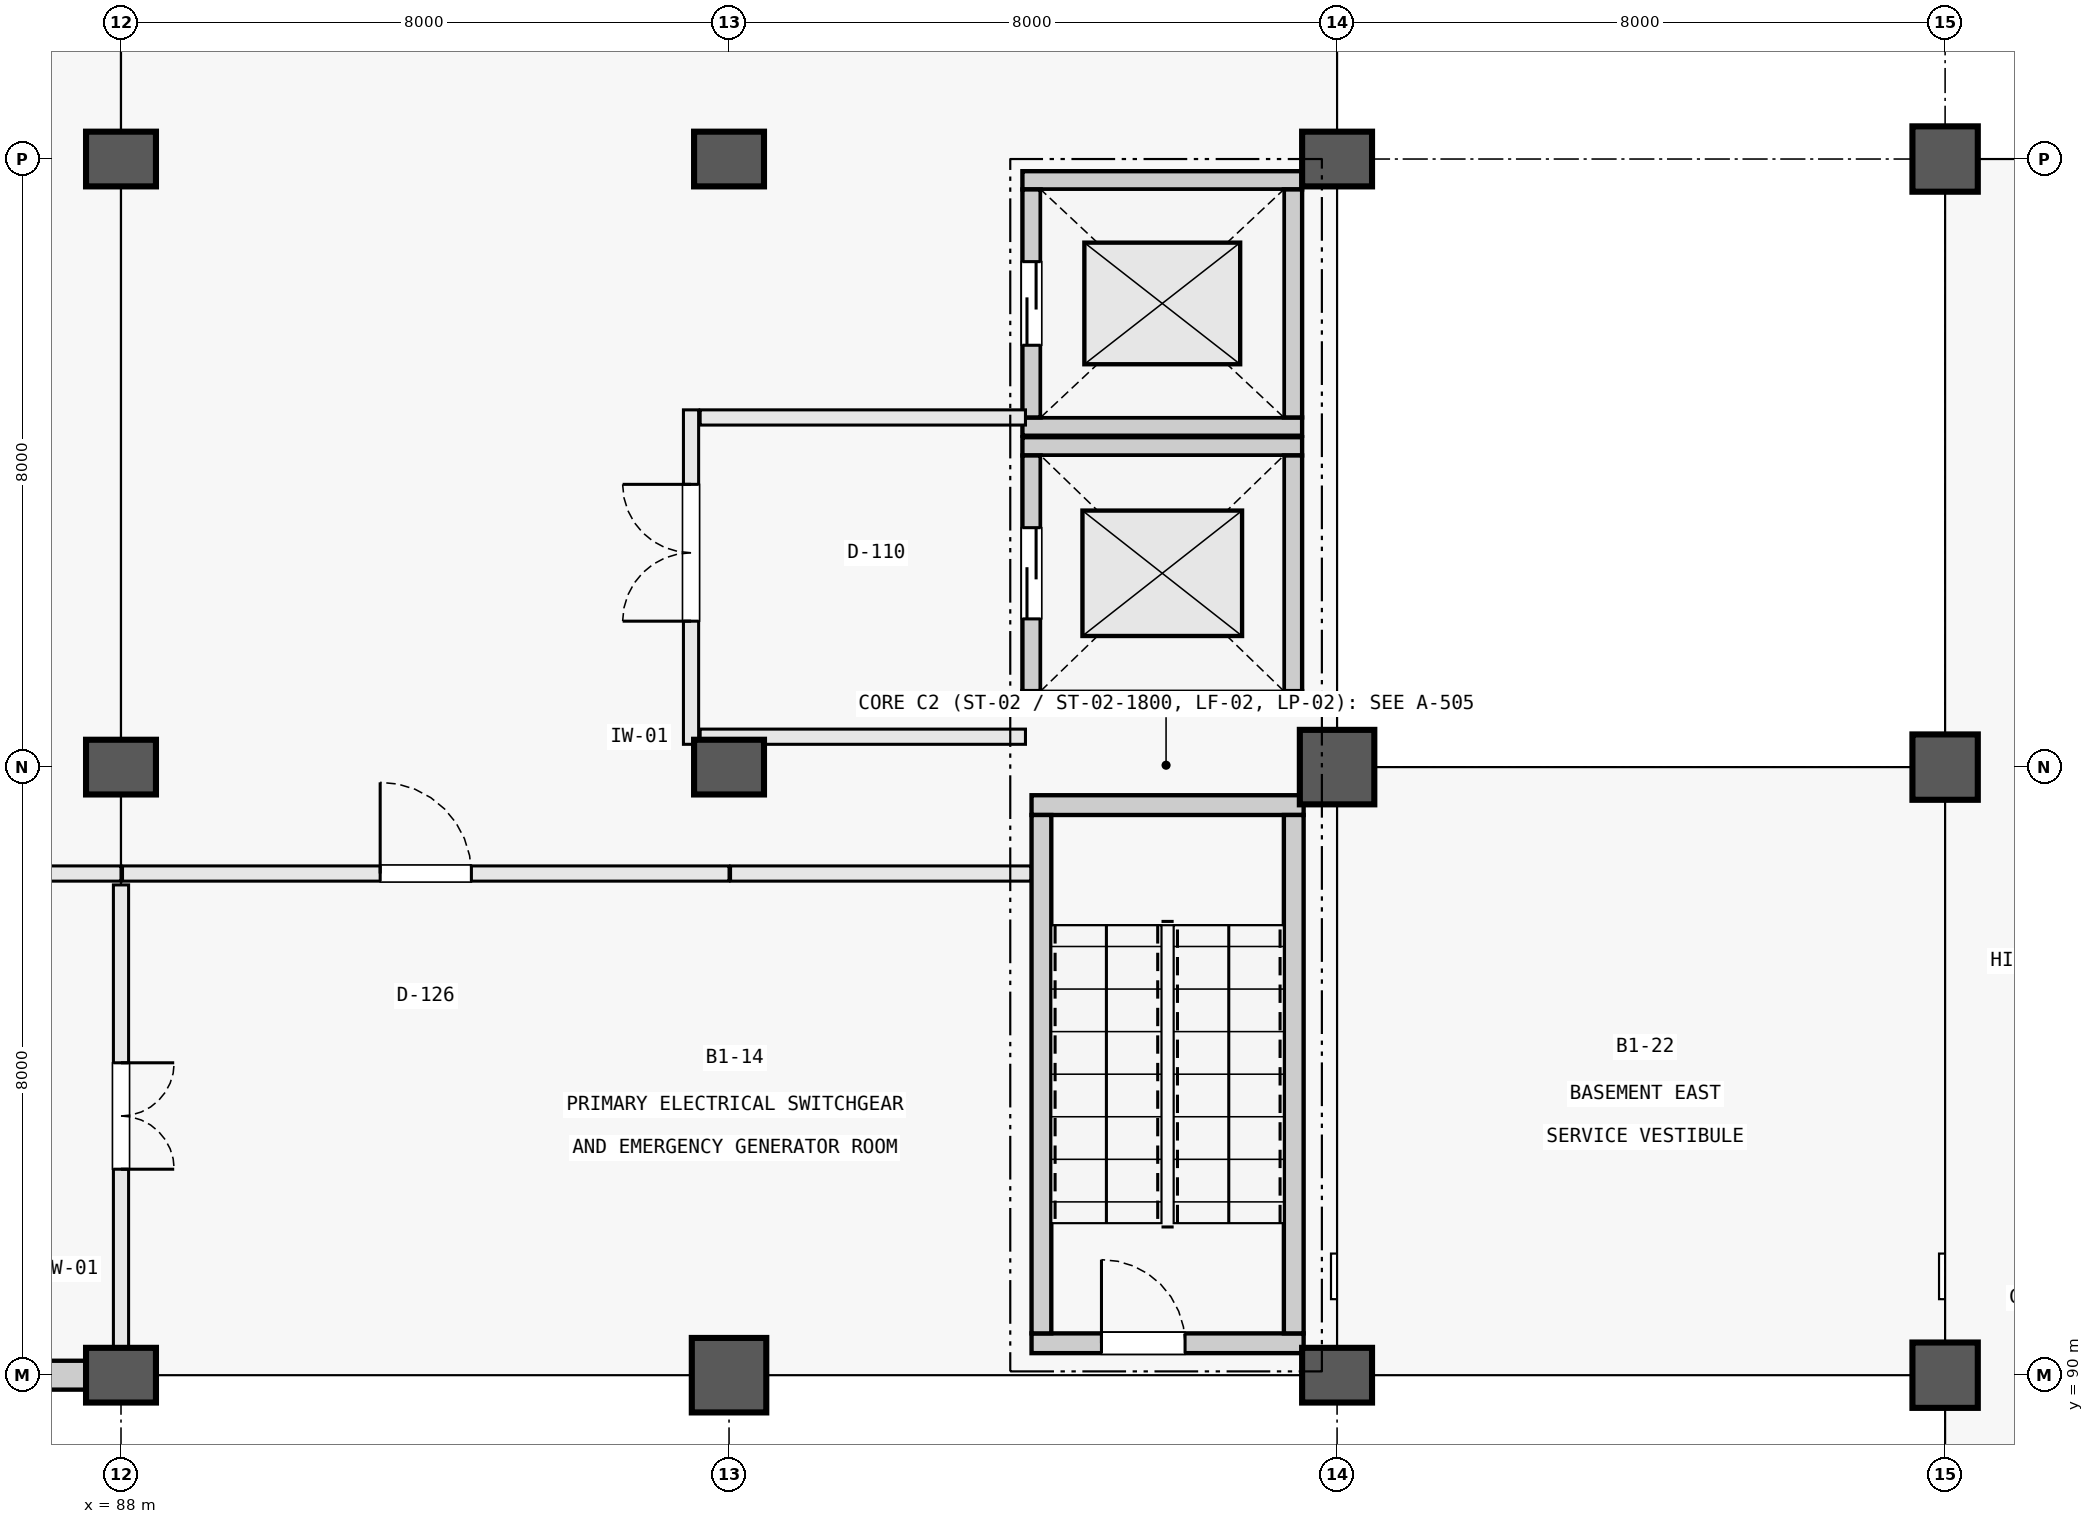
"""IFC4 building model, lengths in metres.
Left out: names, types, materials, properties, quantities, classifications, styles, units other than length and angle.
Written with IfcOpenShell. Run it as: python <this file> out.ifc"""

import sys

from ifc_helpers import new_model, si_unit, direction, frame, frame_2d, origin, origin_2d, place, context, subcontext, project, spatial, rectangle, extrude, element, fill, save


model = new_model("IFC4")
c1 = context("Model", 3, precision=1e-05, world=origin(), true_north=direction((0.0, 1.0)))
c2 = subcontext(c1, "Body", "Model", "MODEL_VIEW")
j1 = project(units=[si_unit("LENGTHUNIT", "METRE"), si_unit("PLANEANGLEUNIT", "RADIAN")], contexts=[c1])
p1 = place(None, origin())
s1 = spatial("IfcSite", under=j1, at=p1, CompositionType="ELEMENT")
p2 = place(p1, origin())
s2 = spatial("IfcBuilding", under=s1, at=p2, CompositionType="ELEMENT")
p3 = place(p2, frame((0.0, 0.0, -5.4)))
s3 = spatial("IfcBuildingStorey", under=s2, at=p3, CompositionType="ELEMENT", Elevation=-5.4)
for number, where, z_axis, x_axis in (
    (1, (88.0, 90.0, 0.0), (0.0, 0.0, 1.0), (1.0, 0.0, 0.0)),
    (2, (88.0, 98.0, 0.0), (0.0, 0.0, 1.0), (1.0, 0.0, 0.0)),
    (3, (88.0, 106.0, 0.0), (0.0, 0.0, 1.0), (1.0, 0.0, 0.0)),
):
    element("IfcColumn", number, at=place(p3, frame(where, z_axis=z_axis, x_axis=x_axis)), inside=s3, PredefinedType="COLUMN", context=c2, shape_type="SweptSolid", body=[
        extrude(rectangle(XDim=0.92, YDim=0.72, at=origin_2d()), origin(), (0.0, 0.0, 1.0), 5.4),
    ])
p4 = place(p3, frame((96.0, 90.0, 0.0), z_axis=(0.0, 0.0, 1.0), x_axis=(1.0, 0.0, 0.0)))
e4 = element("IfcColumn", 4, at=p4, inside=s3, PredefinedType="COLUMN", context=c2, shape_type="SweptSolid", body=[
    extrude(rectangle(XDim=0.98, YDim=0.98, at=origin_2d()), origin(), (0.0, 0.0, 1.0), 5.4),
])
for number, where, z_axis, x_axis in (
    (5, (96.0, 98.0, 0.0), (0.0, 0.0, 1.0), (1.0, 0.0, 0.0)),
    (6, (96.0, 106.0, 0.0), (0.0, 0.0, 1.0), (1.0, 0.0, 0.0)),
    (7, (104.0, 90.0, 0.0), (0.0, 0.0, 1.0), (1.0, 0.0, 0.0)),
):
    element("IfcColumn", number, at=place(p3, frame(where, z_axis=z_axis, x_axis=x_axis)), inside=s3, PredefinedType="COLUMN", context=c2, shape_type="SweptSolid", body=[
        extrude(rectangle(XDim=0.92, YDim=0.72, at=origin_2d()), origin(), (0.0, 0.0, 1.0), 5.4),
    ])
p5 = place(p3, frame((104.0, 98.0, 0.0), z_axis=(0.0, 0.0, 1.0), x_axis=(1.0, 0.0, 0.0)))
e8 = element("IfcColumn", 8, at=p5, inside=s3, PredefinedType="COLUMN", context=c2, shape_type="SweptSolid", body=[
    extrude(rectangle(XDim=0.98, YDim=0.98, at=origin_2d()), origin(), (0.0, 0.0, 1.0), 5.4),
])
p6 = place(p3, frame((104.0, 106.0, 0.0), z_axis=(0.0, 0.0, 1.0), x_axis=(1.0, 0.0, 0.0)))
e9 = element("IfcColumn", 9, at=p6, inside=s3, PredefinedType="COLUMN", context=c2, shape_type="SweptSolid", body=[
    extrude(rectangle(XDim=0.92, YDim=0.72, at=origin_2d()), origin(), (0.0, 0.0, 1.0), 5.4),
])
for number, where, z_axis, x_axis in (
    (10, (112.0, 90.0, 0.0), (0.0, 0.0, 1.0), (1.0, 0.0, 0.0)),
    (11, (112.0, 98.0, 0.0), (0.0, 0.0, 1.0), (1.0, 0.0, 0.0)),
    (12, (112.0, 106.0, 0.0), (0.0, 0.0, 1.0), (1.0, 0.0, 0.0)),
):
    element("IfcColumn", number, at=place(p3, frame(where, z_axis=z_axis, x_axis=x_axis)), inside=s3, PredefinedType="COLUMN", context=c2, shape_type="SweptSolid", body=[
        extrude(rectangle(XDim=0.86, YDim=0.86, at=origin_2d()), origin(), (0.0, 0.0, 1.0), 5.4),
    ])
p7 = place(p3, frame((80.49, 90.0, 0.0), z_axis=(0.0, 0.0, 1.0), x_axis=(1.0, 0.0, 0.0)))
e13 = element("IfcWall", 13, at=p7, inside=s3, PredefinedType="SHEAR", context=c2, shape_type="SweptSolid", body=[
    extrude(rectangle(XDim=7.05, YDim=0.38, at=frame_2d((3.525, 0.0))), origin(), (0.0, 0.0, 1.0), 4.98),
])
p8 = place(p3, frame((99.98, 90.42, 0.0), z_axis=(0.0, 0.0, 1.0), x_axis=(1.0, 0.0, 0.0)))
e14 = element("IfcWall", 14, at=p8, inside=s3, PredefinedType="SOLIDWALL", context=c2, shape_type="SweptSolid", body=[
    extrude(rectangle(XDim=3.58, YDim=0.26, at=frame_2d((1.79, 0.0))), origin(), (0.0, 0.0, 1.0), 5.4),
])
p9 = place(p8, frame((0.92, 0.0, 0.0)))
e15 = element("IfcOpeningElement", 15, at=p9, cuts=e14, PredefinedType="OPENING", context=c2, shape_type="SweptSolid", body=[
    extrude(rectangle(XDim=1.1, YDim=2.2, at=frame_2d((0.55, 1.1))), frame((0.0, 0.142, 0.0), z_axis=(0.0, -1.0, 0.0), x_axis=(1.0, 0.0, 0.0)), (0.0, 0.0, 1.0), 0.284),
])
p10 = place(p3, frame((99.98, 97.5, 0.0), z_axis=(0.0, 0.0, 1.0), x_axis=(1.0, 0.0, 0.0)))
e16 = element("IfcWall", 16, at=p10, inside=s3, PredefinedType="SOLIDWALL", context=c2, shape_type="SweptSolid", body=[
    extrude(rectangle(XDim=3.58, YDim=0.26, at=frame_2d((1.79, 0.0))), origin(), (0.0, 0.0, 1.0), 5.4),
])
for number, where, z_axis, x_axis in (
    (17, (100.11, 90.55, 0.0), (0.0, 0.0, 1.0), (0.0, 1.0, 0.0)),
    (18, (103.43, 90.55, 0.0), (0.0, 0.0, 1.0), (0.0, 1.0, 0.0)),
):
    element("IfcWall", number, at=place(p3, frame(where, z_axis=z_axis, x_axis=x_axis)), inside=s3, PredefinedType="SOLIDWALL", context=c2, shape_type="SweptSolid", body=[
        extrude(rectangle(XDim=6.82, YDim=0.26, at=frame_2d((3.41, 0.0))), origin(), (0.0, 0.0, 1.0), 5.4),
    ])
for number, where, z_axis, x_axis in (
    (19, (99.86, 98.88, 0.0), (0.0, 0.0, 1.0), (1.0, 0.0, 0.0)),
    (20, (99.86, 102.22, 0.0), (0.0, 0.0, 1.0), (1.0, 0.0, 0.0)),
):
    element("IfcWall", number, at=place(p3, frame(where, z_axis=z_axis, x_axis=x_axis)), inside=s3, PredefinedType="SOLIDWALL", context=c2, shape_type="SweptSolid", body=[
        extrude(rectangle(XDim=3.68, YDim=0.24, at=frame_2d((1.84, 0.0))), origin(), (0.0, 0.0, 1.0), 5.4),
    ])
p11 = place(p3, frame((99.98, 99.0, 0.0), z_axis=(0.0, 0.0, 1.0), x_axis=(0.0, 1.0, 0.0)))
e21 = element("IfcWall", 21, at=p11, inside=s3, PredefinedType="SOLIDWALL", context=c2, shape_type="SweptSolid", body=[
    extrude(rectangle(XDim=3.1, YDim=0.24, at=frame_2d((1.55, 0.0))), origin(), (0.0, 0.0, 1.0), 5.4),
])
p12 = place(p11, frame((0.95, 0.0, 0.0)))
e22 = element("IfcOpeningElement", 22, at=p12, cuts=e21, PredefinedType="OPENING", context=c2, shape_type="SweptSolid", body=[
    extrude(rectangle(XDim=1.2, YDim=2.2, at=frame_2d((0.6, 1.1))), frame((0.0, 0.132, 0.0), z_axis=(0.0, -1.0, 0.0), x_axis=(1.0, 0.0, 0.0)), (0.0, 0.0, 1.0), 0.264),
])
p13 = place(p3, frame((103.42, 99.0, 0.0), z_axis=(0.0, 0.0, 1.0), x_axis=(0.0, 1.0, 0.0)))
e23 = element("IfcWall", 23, at=p13, inside=s3, PredefinedType="SOLIDWALL", context=c2, shape_type="SweptSolid", body=[
    extrude(rectangle(XDim=3.1, YDim=0.24, at=frame_2d((1.55, 0.0))), origin(), (0.0, 0.0, 1.0), 5.4),
])
for number, where, z_axis, x_axis in (
    (24, (99.86, 102.48, 0.0), (0.0, 0.0, 1.0), (1.0, 0.0, 0.0)),
    (25, (99.86, 105.72, 0.0), (0.0, 0.0, 1.0), (1.0, 0.0, 0.0)),
):
    element("IfcWall", number, at=place(p3, frame(where, z_axis=z_axis, x_axis=x_axis)), inside=s3, PredefinedType="SOLIDWALL", context=c2, shape_type="SweptSolid", body=[
        extrude(rectangle(XDim=3.68, YDim=0.24, at=frame_2d((1.84, 0.0))), origin(), (0.0, 0.0, 1.0), 5.4),
    ])
p14 = place(p3, frame((99.98, 102.6, 0.0), z_axis=(0.0, 0.0, 1.0), x_axis=(0.0, 1.0, 0.0)))
e26 = element("IfcWall", 26, at=p14, inside=s3, PredefinedType="SOLIDWALL", context=c2, shape_type="SweptSolid", body=[
    extrude(rectangle(XDim=3.0, YDim=0.24, at=frame_2d((1.5, 0.0))), origin(), (0.0, 0.0, 1.0), 5.4),
])
p15 = place(p14, frame((0.95, 0.0, 0.0)))
e27 = element("IfcOpeningElement", 27, at=p15, cuts=e26, PredefinedType="OPENING", context=c2, shape_type="SweptSolid", body=[
    extrude(rectangle(XDim=1.1, YDim=2.2, at=frame_2d((0.55, 1.1))), frame((0.0, 0.132, 0.0), z_axis=(0.0, -1.0, 0.0), x_axis=(1.0, 0.0, 0.0)), (0.0, 0.0, 1.0), 0.264),
])
p16 = place(p3, frame((103.42, 102.6, 0.0), z_axis=(0.0, 0.0, 1.0), x_axis=(0.0, 1.0, 0.0)))
e28 = element("IfcWall", 28, at=p16, inside=s3, PredefinedType="SOLIDWALL", context=c2, shape_type="SweptSolid", body=[
    extrude(rectangle(XDim=3.0, YDim=0.24, at=frame_2d((1.5, 0.0))), origin(), (0.0, 0.0, 1.0), 5.4),
])
for number, where, z_axis, x_axis in (
    (29, (95.62, 98.4, 0.0), (0.0, 0.0, 1.0), (1.0, 0.0, 0.0)),
    (30, (95.62, 102.6, 0.0), (0.0, 0.0, 1.0), (1.0, 0.0, 0.0)),
):
    element("IfcWall", number, at=place(p3, frame(where, z_axis=z_axis, x_axis=x_axis)), inside=s3, PredefinedType="PARTITIONING", context=c2, shape_type="SweptSolid", body=[
        extrude(rectangle(XDim=4.28, YDim=0.2, at=frame_2d((2.14, 0.0))), origin(), (0.0, 0.0, 1.0), 4.0),
    ])
p17 = place(p3, frame((95.5, 98.3, 0.0), z_axis=(0.0, 0.0, 1.0), x_axis=(0.0, 1.0, 0.0)))
e31 = element("IfcWall", 31, at=p17, inside=s3, PredefinedType="PARTITIONING", context=c2, shape_type="SweptSolid", body=[
    extrude(rectangle(XDim=4.4, YDim=0.2, at=frame_2d((2.2, 0.0))), origin(), (0.0, 0.0, 1.0), 4.0),
])
p18 = place(p17, frame((1.62, 0.0, 0.0)))
e32 = element("IfcOpeningElement", 32, at=p18, cuts=e31, PredefinedType="OPENING", context=c2, shape_type="SweptSolid", body=[
    extrude(rectangle(XDim=1.8, YDim=2.25, at=frame_2d((0.9, 1.125))), frame((0.0, 0.112, 0.0), z_axis=(0.0, -1.0, 0.0), x_axis=(1.0, 0.0, 0.0)), (0.0, 0.0, 1.0), 0.224),
])
p19 = place(p3, frame((80.02, 96.6, 0.0), z_axis=(0.0, 0.0, 1.0), x_axis=(1.0, 0.0, 0.0)))
e33 = element("IfcWall", 33, at=p19, inside=s3, PredefinedType="PARTITIONING", context=c2, shape_type="SweptSolid", body=[
    extrude(rectangle(XDim=7.98, YDim=0.2, at=frame_2d((3.99, 0.0))), origin(), (0.0, 0.0, 1.0), 3.83),
])
p20 = place(p19, frame((3.29, 0.0, 0.0)))
e34 = element("IfcOpeningElement", 34, at=p20, cuts=e33, PredefinedType="OPENING", context=c2, shape_type="SweptSolid", body=[
    extrude(rectangle(XDim=1.4, YDim=2.2, at=frame_2d((0.7, 1.1))), frame((0.0, 0.112, 0.0), z_axis=(0.0, -1.0, 0.0), x_axis=(1.0, 0.0, 0.0)), (0.0, 0.0, 1.0), 0.224),
])
p21 = place(p3, frame((88.02, 96.6, 0.0), z_axis=(0.0, 0.0, 1.0), x_axis=(1.0, 0.0, 0.0)))
e35 = element("IfcWall", 35, at=p21, inside=s3, PredefinedType="PARTITIONING", context=c2, shape_type="SweptSolid", body=[
    extrude(rectangle(XDim=7.98, YDim=0.2, at=frame_2d((3.99, 0.0))), origin(), (0.0, 0.0, 1.0), 3.83),
])
p22 = place(p21, frame((3.39, 0.0, 0.0)))
e36 = element("IfcOpeningElement", 36, at=p22, cuts=e35, PredefinedType="OPENING", context=c2, shape_type="SweptSolid", body=[
    extrude(rectangle(XDim=1.2, YDim=2.25, at=frame_2d((0.6, 1.125))), frame((0.0, 0.112, 0.0), z_axis=(0.0, -1.0, 0.0), x_axis=(1.0, 0.0, 0.0)), (0.0, 0.0, 1.0), 0.224),
])
p23 = place(p3, frame((96.02, 96.6, 0.0), z_axis=(0.0, 0.0, 1.0), x_axis=(1.0, 0.0, 0.0)))
e37 = element("IfcWall", 37, at=p23, inside=s3, PredefinedType="PARTITIONING", context=c2, shape_type="SweptSolid", body=[
    extrude(rectangle(XDim=3.95, YDim=0.2, at=frame_2d((1.975, 0.0))), origin(), (0.0, 0.0, 1.0), 3.83),
])
p24 = place(p3, frame((88.0, 90.37, 0.0), z_axis=(0.0, 0.0, 1.0), x_axis=(0.0, 1.0, 0.0)))
e38 = element("IfcWall", 38, at=p24, inside=s3, PredefinedType="PARTITIONING", context=c2, shape_type="SweptSolid", body=[
    extrude(rectangle(XDim=6.08, YDim=0.2, at=frame_2d((3.04, 0.0))), origin(), (0.0, 0.0, 1.0), 3.83),
])
p25 = place(p24, frame((2.34, 0.0, 0.0)))
e39 = element("IfcOpeningElement", 39, at=p25, cuts=e38, PredefinedType="OPENING", context=c2, shape_type="SweptSolid", body=[
    extrude(rectangle(XDim=1.4, YDim=2.2, at=frame_2d((0.7, 1.1))), frame((0.0, 0.112, 0.0), z_axis=(0.0, -1.0, 0.0), x_axis=(1.0, 0.0, 0.0)), (0.0, 0.0, 1.0), 0.224),
])
p26 = place(p9, origin())
e40 = element("IfcDoor", 40, at=p26, inside=s3, OperationType="SINGLE_SWING_LEFT", PredefinedType="DOOR", context=c2, shape_type="SweptSolid", body=[
    extrude(rectangle(XDim=1.1, YDim=2.2, at=frame_2d((0.55, 1.1))), frame((0.0, 0.025, 0.0), z_axis=(0.0, -1.0, 0.0), x_axis=(1.0, 0.0, 0.0)), (0.0, 0.0, 1.0), 0.05),
])
fill(e15, e40)
p27 = place(p12, origin())
e41 = element("IfcDoor", 41, at=p27, inside=s3, OperationType="DOUBLE_DOOR_SLIDING", PredefinedType="DOOR", context=c2, shape_type="SweptSolid", body=[
    extrude(rectangle(XDim=1.2, YDim=2.2, at=frame_2d((0.6, 1.1))), frame((0.0, 0.025, 0.0), z_axis=(0.0, -1.0, 0.0), x_axis=(1.0, 0.0, 0.0)), (0.0, 0.0, 1.0), 0.05),
])
fill(e22, e41)
p28 = place(p15, origin())
e42 = element("IfcDoor", 42, at=p28, inside=s3, OperationType="DOUBLE_DOOR_SLIDING", PredefinedType="DOOR", context=c2, shape_type="SweptSolid", body=[
    extrude(rectangle(XDim=1.1, YDim=2.2, at=frame_2d((0.55, 1.1))), frame((0.0, 0.025, 0.0), z_axis=(0.0, -1.0, 0.0), x_axis=(1.0, 0.0, 0.0)), (0.0, 0.0, 1.0), 0.05),
])
fill(e27, e42)
p29 = place(p18, origin())
e43 = element("IfcDoor", 43, at=p29, inside=s3, OperationType="DOUBLE_DOOR_SINGLE_SWING", PredefinedType="DOOR", context=c2, shape_type="SweptSolid", body=[
    extrude(rectangle(XDim=1.8, YDim=2.25, at=frame_2d((0.9, 1.125))), frame((0.0, 0.025, 0.0), z_axis=(0.0, -1.0, 0.0), x_axis=(1.0, 0.0, 0.0)), (0.0, 0.0, 1.0), 0.05),
])
fill(e32, e43)
p30 = place(p22, origin())
e44 = element("IfcDoor", 44, at=p30, inside=s3, OperationType="SINGLE_SWING_LEFT", PredefinedType="DOOR", context=c2, shape_type="SweptSolid", body=[
    extrude(rectangle(XDim=1.2, YDim=2.25, at=frame_2d((0.6, 1.125))), frame((0.0, 0.025, 0.0), z_axis=(0.0, -1.0, 0.0), x_axis=(1.0, 0.0, 0.0)), (0.0, 0.0, 1.0), 0.05),
])
fill(e36, e44)
p31 = place(p25, frame((1.4, 0.0, 0.0), z_axis=(0.0, 0.0, 1.0), x_axis=(-1.0, 0.0, 0.0)))
e45 = element("IfcDoor", 45, at=p31, inside=s3, OperationType="DOUBLE_DOOR_SINGLE_SWING", PredefinedType="DOOR", context=c2, shape_type="SweptSolid", body=[
    extrude(rectangle(XDim=1.4, YDim=2.2, at=frame_2d((0.7, 1.1))), frame((0.0, 0.025, 0.0), z_axis=(0.0, -1.0, 0.0), x_axis=(1.0, 0.0, 0.0)), (0.0, 0.0, 1.0), 0.05),
])
fill(e39, e45)
save(model, sys.argv[1])
